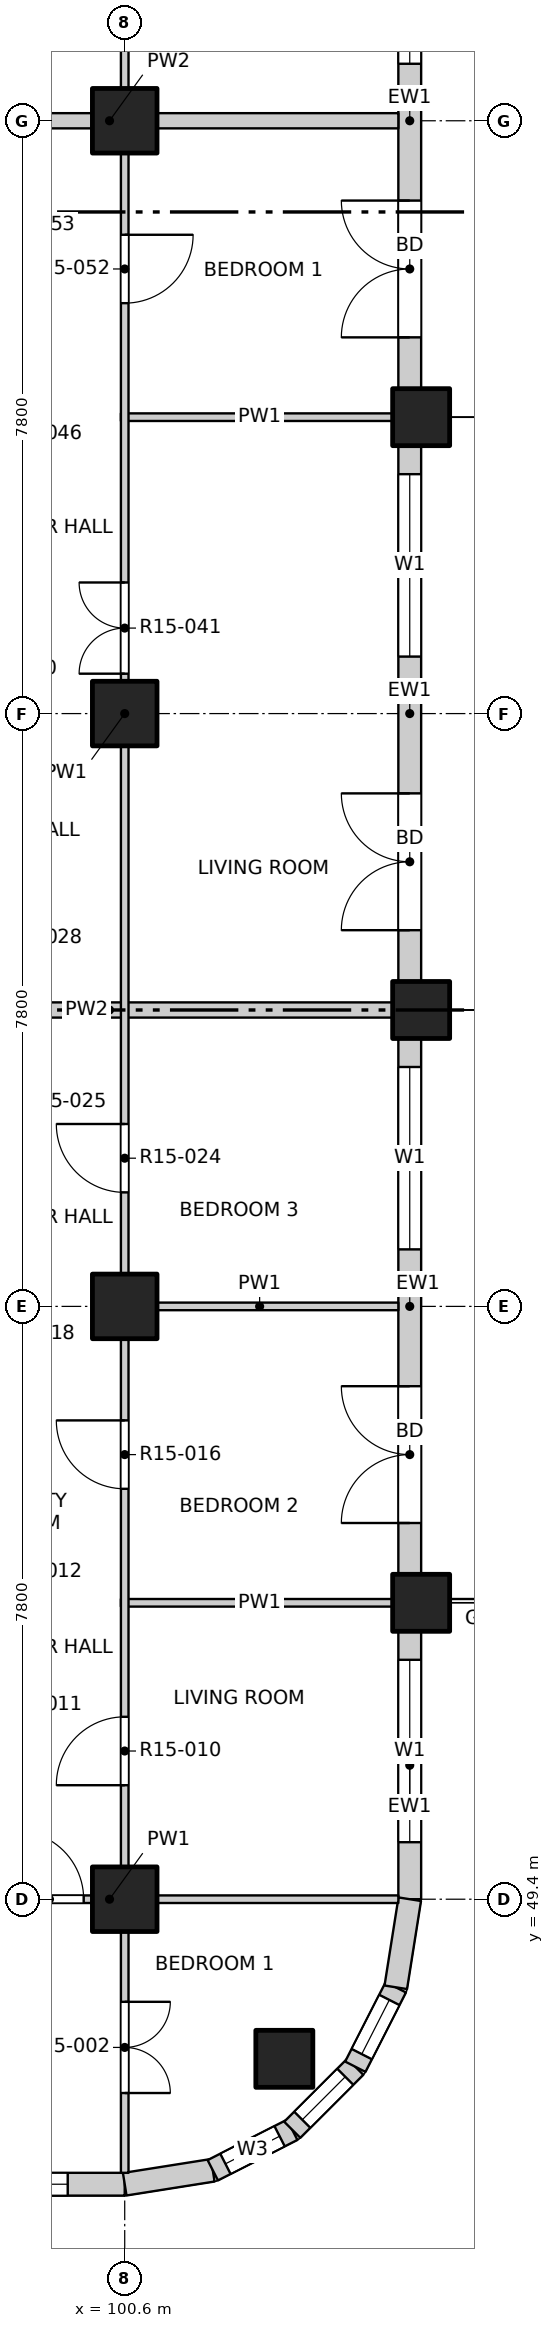
"""IFC4 building model, lengths in metres.
Left out: names, types, materials, properties, quantities, classifications, styles, units other than length and angle.
Written with IfcOpenShell. Run it as: python <this file> out.ifc"""

import sys

from ifc_helpers import new_model, si_unit, direction, frame, frame_2d, origin, origin_2d, place, context, subcontext, project, spatial, rectangle, extrude, element, fill, save


model = new_model("IFC4")
c1 = context("Model", 3, precision=1e-05, world=origin(), true_north=direction((0.0, 1.0)))
c2 = subcontext(c1, "Body", "Model", "MODEL_VIEW")
j1 = project(units=[si_unit("LENGTHUNIT", "METRE"), si_unit("PLANEANGLEUNIT", "RADIAN")], contexts=[c1])
p1 = place(None, origin())
s1 = spatial("IfcSite", under=j1, at=p1, CompositionType="ELEMENT")
p2 = place(p1, origin())
s2 = spatial("IfcBuilding", under=s1, at=p2, CompositionType="ELEMENT")
p3 = place(p2, frame((0.0, 0.0, 158.8)))
s3 = spatial("IfcBuildingStorey", under=s2, at=p3, CompositionType="ELEMENT", Elevation=158.8)
for number, where, z_axis, x_axis in (
    (1, (102.7, 47.3, -0.25), (0.0, 0.0, 1.0), (1.0, 0.0, 0.0)),
    (2, (104.5, 53.3, -0.25), (0.0, 0.0, 1.0), (1.0, 0.0, 0.0)),
    (3, (104.5, 61.1, -0.25), (0.0, 0.0, 1.0), (1.0, 0.0, 0.0)),
    (4, (104.5, 68.9, -0.25), (0.0, 0.0, 1.0), (1.0, 0.0, 0.0)),
):
    element("IfcColumn", number, at=place(p3, frame(where, z_axis=z_axis, x_axis=x_axis)), inside=s3, PredefinedType="COLUMN", context=c2, shape_type="SweptSolid", body=[
        extrude(rectangle(XDim=0.75, YDim=0.75, at=origin_2d()), origin(), (0.0, 0.0, 1.0), 3.4),
    ])
for number, where, z_axis, x_axis in (
    (5, (100.6, 49.4, -0.25), (0.0, 0.0, 1.0), (1.0, 0.0, 0.0)),
    (6, (100.6, 57.2, -0.25), (0.0, 0.0, 1.0), (1.0, 0.0, 0.0)),
    (7, (100.6, 65.0, -0.25), (0.0, 0.0, 1.0), (1.0, 0.0, 0.0)),
    (8, (100.6, 72.8, -0.25), (0.0, 0.0, 1.0), (1.0, 0.0, 0.0)),
):
    element("IfcColumn", number, at=place(p3, frame(where, z_axis=z_axis, x_axis=x_axis)), inside=s3, PredefinedType="COLUMN", context=c2, shape_type="SweptSolid", body=[
        extrude(rectangle(XDim=0.85, YDim=0.85, at=origin_2d()), origin(), (0.0, 0.0, 1.0), 3.4),
    ])
p4 = place(p3, frame((97.075, 45.65, 0.0), z_axis=(0.0, 0.0, 1.0), x_axis=(1.0, 0.0, 0.0)))
e9 = element("IfcWall", 9, at=p4, inside=s3, PredefinedType="SOLIDWALL", context=c2, shape_type="SweptSolid", body=[
    extrude(rectangle(XDim=3.525, YDim=0.3, at=frame_2d((1.763, 0.0))), origin(), (0.0, 0.0, 1.0), 2.7),
])
p5 = place(p4, frame((0.375, 0.0, 0.9)))
e10 = element("IfcOpeningElement", 10, at=p5, cuts=e9, PredefinedType="OPENING", context=c2, shape_type="SweptSolid", body=[
    extrude(rectangle(XDim=2.4, YDim=1.8, at=frame_2d((1.2, 0.9))), frame((0.0, 0.16, 0.0), z_axis=(0.0, -1.0, 0.0), x_axis=(1.0, 0.0, 0.0)), (0.0, 0.0, 1.0), 0.32),
])
p6 = place(p3, frame((104.35, 49.4, 0.0), z_axis=(0.0, 0.0, 1.0), x_axis=(0.0, 1.0, 0.0)))
e11 = element("IfcWall", 11, at=p6, inside=s3, PredefinedType="SOLIDWALL", context=c2, shape_type="SweptSolid", body=[
    extrude(rectangle(XDim=3.525, YDim=0.3, at=frame_2d((1.763, 0.0))), origin(), (0.0, 0.0, 1.0), 2.7),
])
p7 = place(p6, frame((0.75, 0.0, 0.9)))
e12 = element("IfcOpeningElement", 12, at=p7, cuts=e11, PredefinedType="OPENING", context=c2, shape_type="SweptSolid", body=[
    extrude(rectangle(XDim=2.4, YDim=1.8, at=frame_2d((1.2, 0.9))), frame((0.0, 0.16, 0.0), z_axis=(0.0, -1.0, 0.0), x_axis=(1.0, 0.0, 0.0)), (0.0, 0.0, 1.0), 0.32),
])
p8 = place(p3, frame((104.35, 53.675, 0.0), z_axis=(0.0, 0.0, 1.0), x_axis=(0.0, 1.0, 0.0)))
e13 = element("IfcWall", 13, at=p8, inside=s3, PredefinedType="SOLIDWALL", context=c2, shape_type="SweptSolid", body=[
    extrude(rectangle(XDim=7.05, YDim=0.3, at=frame_2d((3.525, 0.0))), origin(), (0.0, 0.0, 1.0), 2.7),
])
p9 = place(p8, frame((0.675, 0.0, 0.0)))
e14 = element("IfcOpeningElement", 14, at=p9, cuts=e13, PredefinedType="OPENING", context=c2, shape_type="SweptSolid", body=[
    extrude(rectangle(XDim=1.8, YDim=2.4, at=frame_2d((0.9, 1.2))), frame((0.0, 0.16, 0.0), z_axis=(0.0, -1.0, 0.0), x_axis=(1.0, 0.0, 0.0)), (0.0, 0.0, 1.0), 0.32),
])
p10 = place(p8, frame((4.275, 0.0, 0.9)))
e15 = element("IfcOpeningElement", 15, at=p10, cuts=e13, PredefinedType="OPENING", context=c2, shape_type="SweptSolid", body=[
    extrude(rectangle(XDim=2.4, YDim=1.8, at=frame_2d((1.2, 0.9))), frame((0.0, 0.16, 0.0), z_axis=(0.0, -1.0, 0.0), x_axis=(1.0, 0.0, 0.0)), (0.0, 0.0, 1.0), 0.32),
])
p11 = place(p3, frame((104.35, 61.475, 0.0), z_axis=(0.0, 0.0, 1.0), x_axis=(0.0, 1.0, 0.0)))
e16 = element("IfcWall", 16, at=p11, inside=s3, PredefinedType="SOLIDWALL", context=c2, shape_type="SweptSolid", body=[
    extrude(rectangle(XDim=7.05, YDim=0.3, at=frame_2d((3.525, 0.0))), origin(), (0.0, 0.0, 1.0), 2.7),
])
p12 = place(p11, frame((0.675, 0.0, 0.0)))
e17 = element("IfcOpeningElement", 17, at=p12, cuts=e16, PredefinedType="OPENING", context=c2, shape_type="SweptSolid", body=[
    extrude(rectangle(XDim=1.8, YDim=2.4, at=frame_2d((0.9, 1.2))), frame((0.0, 0.16, 0.0), z_axis=(0.0, -1.0, 0.0), x_axis=(1.0, 0.0, 0.0)), (0.0, 0.0, 1.0), 0.32),
])
p13 = place(p11, frame((4.275, 0.0, 0.9)))
e18 = element("IfcOpeningElement", 18, at=p13, cuts=e16, PredefinedType="OPENING", context=c2, shape_type="SweptSolid", body=[
    extrude(rectangle(XDim=2.4, YDim=1.8, at=frame_2d((1.2, 0.9))), frame((0.0, 0.16, 0.0), z_axis=(0.0, -1.0, 0.0), x_axis=(1.0, 0.0, 0.0)), (0.0, 0.0, 1.0), 0.32),
])
p14 = place(p3, frame((104.35, 69.275, 0.0), z_axis=(0.0, 0.0, 1.0), x_axis=(0.0, 1.0, 0.0)))
e19 = element("IfcWall", 19, at=p14, inside=s3, PredefinedType="SOLIDWALL", context=c2, shape_type="SweptSolid", body=[
    extrude(rectangle(XDim=7.05, YDim=0.3, at=frame_2d((3.525, 0.0))), origin(), (0.0, 0.0, 1.0), 2.7),
])
p15 = place(p14, frame((0.675, 0.0, 0.0)))
e20 = element("IfcOpeningElement", 20, at=p15, cuts=e19, PredefinedType="OPENING", context=c2, shape_type="SweptSolid", body=[
    extrude(rectangle(XDim=1.8, YDim=2.4, at=frame_2d((0.9, 1.2))), frame((0.0, 0.16, 0.0), z_axis=(0.0, -1.0, 0.0), x_axis=(1.0, 0.0, 0.0)), (0.0, 0.0, 1.0), 0.32),
])
p16 = place(p14, frame((4.275, 0.0, 0.9)))
e21 = element("IfcOpeningElement", 21, at=p16, cuts=e19, PredefinedType="OPENING", context=c2, shape_type="SweptSolid", body=[
    extrude(rectangle(XDim=2.4, YDim=1.8, at=frame_2d((1.2, 0.9))), frame((0.0, 0.16, 0.0), z_axis=(0.0, -1.0, 0.0), x_axis=(1.0, 0.0, 0.0)), (0.0, 0.0, 1.0), 0.32),
])
p17 = place(p3, frame((100.6, 45.65, 0.0), z_axis=(0.0, 0.0, 1.0), x_axis=(0.987678452879, 0.156496880861, 0.0)))
e22 = element("IfcWall", 22, at=p17, inside=s3, PredefinedType="SOLIDWALL", context=c2, shape_type="SweptSolid", body=[
    extrude(rectangle(XDim=1.173, YDim=0.3, at=frame_2d((0.586, 0.0))), origin(), (0.0, 0.0, 1.0), 2.7),
])
p18 = place(p3, frame((101.759, 45.833, 0.0), z_axis=(0.0, 0.0, 1.0), x_axis=(0.890988677504, 0.454025524128, 0.0)))
e23 = element("IfcWall", 23, at=p18, inside=s3, PredefinedType="SOLIDWALL", context=c2, shape_type="SweptSolid", body=[
    extrude(rectangle(XDim=1.173, YDim=0.3, at=frame_2d((0.587, 0.0))), origin(), (0.0, 0.0, 1.0), 2.7),
])
p19 = place(p18, frame((0.187, 0.0, 0.9)))
e24 = element("IfcOpeningElement", 24, at=p19, cuts=e23, PredefinedType="OPENING", context=c2, shape_type="SweptSolid", body=[
    extrude(rectangle(XDim=0.8, YDim=1.2, at=frame_2d((0.4, 0.6))), frame((0.0, 0.16, 0.0), z_axis=(0.0, -1.0, 0.0), x_axis=(1.0, 0.0, 0.0)), (0.0, 0.0, 1.0), 0.32),
])
p20 = place(p3, frame((102.804, 46.366, 0.0), z_axis=(0.0, 0.0, 1.0), x_axis=(0.707106781187, 0.707106781187, 0.0)))
e25 = element("IfcWall", 25, at=p20, inside=s3, PredefinedType="SOLIDWALL", context=c2, shape_type="SweptSolid", body=[
    extrude(rectangle(XDim=1.173, YDim=0.3, at=frame_2d((0.586, 0.0))), origin(), (0.0, 0.0, 1.0), 2.7),
])
p21 = place(p20, frame((0.187, 0.0, 0.9)))
e26 = element("IfcOpeningElement", 26, at=p21, cuts=e25, PredefinedType="OPENING", context=c2, shape_type="SweptSolid", body=[
    extrude(rectangle(XDim=0.8, YDim=1.2, at=frame_2d((0.4, 0.6))), frame((0.0, 0.16, 0.0), z_axis=(0.0, -1.0, 0.0), x_axis=(1.0, 0.0, 0.0)), (0.0, 0.0, 1.0), 0.32),
])
p22 = place(p3, frame((103.634, 47.196, 0.0), z_axis=(0.0, 0.0, 1.0), x_axis=(0.454025524128, 0.890988677504, 0.0)))
e27 = element("IfcWall", 27, at=p22, inside=s3, PredefinedType="SOLIDWALL", context=c2, shape_type="SweptSolid", body=[
    extrude(rectangle(XDim=1.173, YDim=0.3, at=frame_2d((0.587, 0.0))), origin(), (0.0, 0.0, 1.0), 2.7),
])
p23 = place(p22, frame((0.187, 0.0, 0.9)))
e28 = element("IfcOpeningElement", 28, at=p23, cuts=e27, PredefinedType="OPENING", context=c2, shape_type="SweptSolid", body=[
    extrude(rectangle(XDim=0.8, YDim=1.2, at=frame_2d((0.4, 0.6))), frame((0.0, 0.16, 0.0), z_axis=(0.0, -1.0, 0.0), x_axis=(1.0, 0.0, 0.0)), (0.0, 0.0, 1.0), 0.32),
])
p24 = place(p3, frame((104.167, 48.241, 0.0), z_axis=(0.0, 0.0, 1.0), x_axis=(0.156496880861, 0.987678452879, 0.0)))
e29 = element("IfcWall", 29, at=p24, inside=s3, PredefinedType="SOLIDWALL", context=c2, shape_type="SweptSolid", body=[
    extrude(rectangle(XDim=1.173, YDim=0.3, at=frame_2d((0.586, 0.0))), origin(), (0.0, 0.0, 1.0), 2.7),
])
p25 = place(p3, frame((96.6, 49.4, 0.0), z_axis=(0.0, 0.0, 1.0), x_axis=(1.0, 0.0, 0.0)))
e30 = element("IfcWall", 30, at=p25, inside=s3, PredefinedType="PARTITIONING", context=c2, shape_type="SweptSolid", body=[
    extrude(rectangle(XDim=7.6, YDim=0.1, at=frame_2d((3.8, 0.0))), origin(), (0.0, 0.0, 1.0), 3.15),
])
p26 = place(p25, frame((2.56, 0.0, 0.0)))
e31 = element("IfcOpeningElement", 31, at=p26, cuts=e30, PredefinedType="OPENING", context=c2, shape_type="SweptSolid", body=[
    extrude(rectangle(XDim=0.9, YDim=2.1, at=frame_2d((0.45, 1.05))), frame((0.0, 0.06, 0.0), z_axis=(0.0, -1.0, 0.0), x_axis=(1.0, 0.0, 0.0)), (0.0, 0.0, 1.0), 0.12),
])
for number, where, z_axis, x_axis in (
    (32, (100.55, 53.3, 0.0), (0.0, 0.0, 1.0), (1.0, 0.0, 0.0)),
    (33, (100.55, 57.2, 0.0), (0.0, 0.0, 1.0), (1.0, 0.0, 0.0)),
):
    element("IfcWall", number, at=place(p3, frame(where, z_axis=z_axis, x_axis=x_axis)), inside=s3, PredefinedType="PARTITIONING", context=c2, shape_type="SweptSolid", body=[
        extrude(rectangle(XDim=3.65, YDim=0.1, at=frame_2d((1.825, 0.0))), origin(), (0.0, 0.0, 1.0), 3.15),
    ])
p27 = place(p3, frame((96.6, 61.1, 0.0), z_axis=(0.0, 0.0, 1.0), x_axis=(1.0, 0.0, 0.0)))
e34 = element("IfcWall", 34, at=p27, inside=s3, PredefinedType="PARTITIONING", context=c2, shape_type="SweptSolid", body=[
    extrude(rectangle(XDim=7.6, YDim=0.2, at=frame_2d((3.8, 0.0))), origin(), (0.0, 0.0, 1.0), 2.55),
])
p28 = place(p3, frame((100.55, 68.9, 0.0), z_axis=(0.0, 0.0, 1.0), x_axis=(1.0, 0.0, 0.0)))
e35 = element("IfcWall", 35, at=p28, inside=s3, PredefinedType="PARTITIONING", context=c2, shape_type="SweptSolid", body=[
    extrude(rectangle(XDim=3.65, YDim=0.1, at=frame_2d((1.825, 0.0))), origin(), (0.0, 0.0, 1.0), 2.55),
])
p29 = place(p3, frame((96.6, 72.8, 0.0), z_axis=(0.0, 0.0, 1.0), x_axis=(1.0, 0.0, 0.0)))
e36 = element("IfcWall", 36, at=p29, inside=s3, PredefinedType="PARTITIONING", context=c2, shape_type="SweptSolid", body=[
    extrude(rectangle(XDim=7.6, YDim=0.2, at=frame_2d((3.8, 0.0))), origin(), (0.0, 0.0, 1.0), 3.15),
])
p30 = place(p3, frame((100.6, 45.8, 0.0), z_axis=(0.0, 0.0, 1.0), x_axis=(0.0, 1.0, 0.0)))
e37 = element("IfcWall", 37, at=p30, inside=s3, PredefinedType="PARTITIONING", context=c2, shape_type="SweptSolid", body=[
    extrude(rectangle(XDim=38.4, YDim=0.1, at=frame_2d((19.2, 0.0))), origin(), (0.0, 0.0, 1.0), 3.15),
])
p31 = place(p30, frame((1.05, 0.0, 0.0)))
e38 = element("IfcOpeningElement", 38, at=p31, cuts=e37, PredefinedType="OPENING", context=c2, shape_type="SweptSolid", body=[
    extrude(rectangle(XDim=1.2, YDim=2.1, at=frame_2d((0.6, 1.05))), frame((0.0, 0.06, 0.0), z_axis=(0.0, -1.0, 0.0), x_axis=(1.0, 0.0, 0.0)), (0.0, 0.0, 1.0), 0.12),
])
p32 = place(p30, frame((5.1, 0.0, 0.0)))
e39 = element("IfcOpeningElement", 39, at=p32, cuts=e37, PredefinedType="OPENING", context=c2, shape_type="SweptSolid", body=[
    extrude(rectangle(XDim=0.9, YDim=2.1, at=frame_2d((0.45, 1.05))), frame((0.0, 0.06, 0.0), z_axis=(0.0, -1.0, 0.0), x_axis=(1.0, 0.0, 0.0)), (0.0, 0.0, 1.0), 0.12),
])
p33 = place(p30, frame((9.0, 0.0, 0.0)))
e40 = element("IfcOpeningElement", 40, at=p33, cuts=e37, PredefinedType="OPENING", context=c2, shape_type="SweptSolid", body=[
    extrude(rectangle(XDim=0.9, YDim=2.1, at=frame_2d((0.45, 1.05))), frame((0.0, 0.06, 0.0), z_axis=(0.0, -1.0, 0.0), x_axis=(1.0, 0.0, 0.0)), (0.0, 0.0, 1.0), 0.12),
])
p34 = place(p30, frame((12.9, 0.0, 0.0)))
e41 = element("IfcOpeningElement", 41, at=p34, cuts=e37, PredefinedType="OPENING", context=c2, shape_type="SweptSolid", body=[
    extrude(rectangle(XDim=0.9, YDim=2.1, at=frame_2d((0.45, 1.05))), frame((0.0, 0.06, 0.0), z_axis=(0.0, -1.0, 0.0), x_axis=(1.0, 0.0, 0.0)), (0.0, 0.0, 1.0), 0.12),
])
p35 = place(p30, frame((19.725, 0.0, 0.0)))
e42 = element("IfcOpeningElement", 42, at=p35, cuts=e37, PredefinedType="OPENING", context=c2, shape_type="SweptSolid", body=[
    extrude(rectangle(XDim=1.2, YDim=2.1, at=frame_2d((0.6, 1.05))), frame((0.0, 0.06, 0.0), z_axis=(0.0, -1.0, 0.0), x_axis=(1.0, 0.0, 0.0)), (0.0, 0.0, 1.0), 0.12),
])
p36 = place(p30, frame((24.6, 0.0, 0.0)))
e43 = element("IfcOpeningElement", 43, at=p36, cuts=e37, PredefinedType="OPENING", context=c2, shape_type="SweptSolid", body=[
    extrude(rectangle(XDim=0.9, YDim=2.1, at=frame_2d((0.45, 1.05))), frame((0.0, 0.06, 0.0), z_axis=(0.0, -1.0, 0.0), x_axis=(1.0, 0.0, 0.0)), (0.0, 0.0, 1.0), 0.12),
])
p37 = place(p30, frame((30.3, 0.0, 0.0)))
e44 = element("IfcOpeningElement", 44, at=p37, cuts=e37, PredefinedType="OPENING", context=c2, shape_type="SweptSolid", body=[
    extrude(rectangle(XDim=1.2, YDim=2.1, at=frame_2d((0.6, 1.05))), frame((0.0, 0.06, 0.0), z_axis=(0.0, -1.0, 0.0), x_axis=(1.0, 0.0, 0.0)), (0.0, 0.0, 1.0), 0.12),
])
p38 = place(p30, frame((36.15, 0.0, 0.0)))
e45 = element("IfcOpeningElement", 45, at=p38, cuts=e37, PredefinedType="OPENING", context=c2, shape_type="SweptSolid", body=[
    extrude(rectangle(XDim=1.2, YDim=2.1, at=frame_2d((0.6, 1.05))), frame((0.0, 0.06, 0.0), z_axis=(0.0, -1.0, 0.0), x_axis=(1.0, 0.0, 0.0)), (0.0, 0.0, 1.0), 0.12),
])
p39 = place(p5, origin())
e46 = element("IfcWindow", 46, at=p39, inside=s3, PartitioningType="DOUBLE_PANEL_VERTICAL", PredefinedType="WINDOW", context=c2, shape_type="SweptSolid", body=[
    extrude(rectangle(XDim=2.4, YDim=1.8, at=frame_2d((1.2, 0.9))), frame((0.0, 0.03, 0.0), z_axis=(0.0, -1.0, 0.0), x_axis=(1.0, 0.0, 0.0)), (0.0, 0.0, 1.0), 0.06),
])
fill(e10, e46)
p40 = place(p7, origin())
e47 = element("IfcWindow", 47, at=p40, inside=s3, PartitioningType="DOUBLE_PANEL_VERTICAL", PredefinedType="WINDOW", context=c2, shape_type="SweptSolid", body=[
    extrude(rectangle(XDim=2.4, YDim=1.8, at=frame_2d((1.2, 0.9))), frame((0.0, 0.03, 0.0), z_axis=(0.0, -1.0, 0.0), x_axis=(1.0, 0.0, 0.0)), (0.0, 0.0, 1.0), 0.06),
])
fill(e12, e47)
p41 = place(p9, origin())
e48 = element("IfcDoor", 48, at=p41, inside=s3, OperationType="DOUBLE_DOOR_SINGLE_SWING", PredefinedType="DOOR", context=c2, shape_type="SweptSolid", body=[
    extrude(rectangle(XDim=1.8, YDim=2.4, at=frame_2d((0.9, 1.2))), frame((0.0, 0.025, 0.0), z_axis=(0.0, -1.0, 0.0), x_axis=(1.0, 0.0, 0.0)), (0.0, 0.0, 1.0), 0.05),
])
fill(e14, e48)
p42 = place(p10, origin())
e49 = element("IfcWindow", 49, at=p42, inside=s3, PartitioningType="DOUBLE_PANEL_VERTICAL", PredefinedType="WINDOW", context=c2, shape_type="SweptSolid", body=[
    extrude(rectangle(XDim=2.4, YDim=1.8, at=frame_2d((1.2, 0.9))), frame((0.0, 0.03, 0.0), z_axis=(0.0, -1.0, 0.0), x_axis=(1.0, 0.0, 0.0)), (0.0, 0.0, 1.0), 0.06),
])
fill(e15, e49)
p43 = place(p12, origin())
e50 = element("IfcDoor", 50, at=p43, inside=s3, OperationType="DOUBLE_DOOR_SINGLE_SWING", PredefinedType="DOOR", context=c2, shape_type="SweptSolid", body=[
    extrude(rectangle(XDim=1.8, YDim=2.4, at=frame_2d((0.9, 1.2))), frame((0.0, 0.025, 0.0), z_axis=(0.0, -1.0, 0.0), x_axis=(1.0, 0.0, 0.0)), (0.0, 0.0, 1.0), 0.05),
])
fill(e17, e50)
p44 = place(p13, origin())
e51 = element("IfcWindow", 51, at=p44, inside=s3, PartitioningType="DOUBLE_PANEL_VERTICAL", PredefinedType="WINDOW", context=c2, shape_type="SweptSolid", body=[
    extrude(rectangle(XDim=2.4, YDim=1.8, at=frame_2d((1.2, 0.9))), frame((0.0, 0.03, 0.0), z_axis=(0.0, -1.0, 0.0), x_axis=(1.0, 0.0, 0.0)), (0.0, 0.0, 1.0), 0.06),
])
fill(e18, e51)
p45 = place(p15, origin())
e52 = element("IfcDoor", 52, at=p45, inside=s3, OperationType="DOUBLE_DOOR_SINGLE_SWING", PredefinedType="DOOR", context=c2, shape_type="SweptSolid", body=[
    extrude(rectangle(XDim=1.8, YDim=2.4, at=frame_2d((0.9, 1.2))), frame((0.0, 0.025, 0.0), z_axis=(0.0, -1.0, 0.0), x_axis=(1.0, 0.0, 0.0)), (0.0, 0.0, 1.0), 0.05),
])
fill(e20, e52)
p46 = place(p16, origin())
e53 = element("IfcWindow", 53, at=p46, inside=s3, PartitioningType="DOUBLE_PANEL_VERTICAL", PredefinedType="WINDOW", context=c2, shape_type="SweptSolid", body=[
    extrude(rectangle(XDim=2.4, YDim=1.8, at=frame_2d((1.2, 0.9))), frame((0.0, 0.03, 0.0), z_axis=(0.0, -1.0, 0.0), x_axis=(1.0, 0.0, 0.0)), (0.0, 0.0, 1.0), 0.06),
])
fill(e21, e53)
p47 = place(p19, origin())
e54 = element("IfcWindow", 54, at=p47, inside=s3, PartitioningType="SINGLE_PANEL", PredefinedType="WINDOW", context=c2, shape_type="SweptSolid", body=[
    extrude(rectangle(XDim=0.8, YDim=1.2, at=frame_2d((0.4, 0.6))), frame((0.0, 0.03, 0.0), z_axis=(0.0, -1.0, 0.0), x_axis=(1.0, 0.0, 0.0)), (0.0, 0.0, 1.0), 0.06),
])
fill(e24, e54)
p48 = place(p21, origin())
e55 = element("IfcWindow", 55, at=p48, inside=s3, PartitioningType="SINGLE_PANEL", PredefinedType="WINDOW", context=c2, shape_type="SweptSolid", body=[
    extrude(rectangle(XDim=0.8, YDim=1.2, at=frame_2d((0.4, 0.6))), frame((0.0, 0.03, 0.0), z_axis=(0.0, -1.0, 0.0), x_axis=(1.0, 0.0, 0.0)), (0.0, 0.0, 1.0), 0.06),
])
fill(e26, e55)
p49 = place(p23, origin())
e56 = element("IfcWindow", 56, at=p49, inside=s3, PartitioningType="SINGLE_PANEL", PredefinedType="WINDOW", context=c2, shape_type="SweptSolid", body=[
    extrude(rectangle(XDim=0.8, YDim=1.2, at=frame_2d((0.4, 0.6))), frame((0.0, 0.03, 0.0), z_axis=(0.0, -1.0, 0.0), x_axis=(1.0, 0.0, 0.0)), (0.0, 0.0, 1.0), 0.06),
])
fill(e28, e56)
p50 = place(p31, origin())
e57 = element("IfcDoor", 57, at=p50, inside=s3, OperationType="DOUBLE_DOOR_SINGLE_SWING", PredefinedType="DOOR", context=c2, shape_type="SweptSolid", body=[
    extrude(rectangle(XDim=1.2, YDim=2.1, at=frame_2d((0.6, 1.05))), frame((0.0, 0.025, 0.0), z_axis=(0.0, -1.0, 0.0), x_axis=(1.0, 0.0, 0.0)), (0.0, 0.0, 1.0), 0.05),
])
fill(e38, e57)
p51 = place(p26, origin())
e58 = element("IfcDoor", 58, at=p51, inside=s3, OperationType="SINGLE_SWING_LEFT", PredefinedType="DOOR", context=c2, shape_type="SweptSolid", body=[
    extrude(rectangle(XDim=0.9, YDim=2.1, at=frame_2d((0.45, 1.05))), frame((0.0, 0.025, 0.0), z_axis=(0.0, -1.0, 0.0), x_axis=(1.0, 0.0, 0.0)), (0.0, 0.0, 1.0), 0.05),
])
fill(e31, e58)
p52 = place(p32, origin())
e59 = element("IfcDoor", 59, at=p52, inside=s3, OperationType="SINGLE_SWING_LEFT", PredefinedType="DOOR", context=c2, shape_type="SweptSolid", body=[
    extrude(rectangle(XDim=0.9, YDim=2.1, at=frame_2d((0.45, 1.05))), frame((0.0, 0.025, 0.0), z_axis=(0.0, -1.0, 0.0), x_axis=(1.0, 0.0, 0.0)), (0.0, 0.0, 1.0), 0.05),
])
fill(e39, e59)
p53 = place(p33, origin())
e60 = element("IfcDoor", 60, at=p53, inside=s3, OperationType="SINGLE_SWING_RIGHT", PredefinedType="DOOR", context=c2, shape_type="SweptSolid", body=[
    extrude(rectangle(XDim=0.9, YDim=2.1, at=frame_2d((0.45, 1.05))), frame((0.0, 0.025, 0.0), z_axis=(0.0, -1.0, 0.0), x_axis=(1.0, 0.0, 0.0)), (0.0, 0.0, 1.0), 0.05),
])
fill(e40, e60)
p54 = place(p34, origin())
e61 = element("IfcDoor", 61, at=p54, inside=s3, OperationType="SINGLE_SWING_RIGHT", PredefinedType="DOOR", context=c2, shape_type="SweptSolid", body=[
    extrude(rectangle(XDim=0.9, YDim=2.1, at=frame_2d((0.45, 1.05))), frame((0.0, 0.025, 0.0), z_axis=(0.0, -1.0, 0.0), x_axis=(1.0, 0.0, 0.0)), (0.0, 0.0, 1.0), 0.05),
])
fill(e41, e61)
p55 = place(p35, origin())
e62 = element("IfcDoor", 62, at=p55, inside=s3, OperationType="DOUBLE_DOOR_SINGLE_SWING", PredefinedType="DOOR", context=c2, shape_type="SweptSolid", body=[
    extrude(rectangle(XDim=1.2, YDim=2.1, at=frame_2d((0.6, 1.05))), frame((0.0, 0.025, 0.0), z_axis=(0.0, -1.0, 0.0), x_axis=(1.0, 0.0, 0.0)), (0.0, 0.0, 1.0), 0.05),
])
fill(e42, e62)
p56 = place(p36, origin())
e63 = element("IfcDoor", 63, at=p56, inside=s3, OperationType="SINGLE_SWING_LEFT", PredefinedType="DOOR", context=c2, shape_type="SweptSolid", body=[
    extrude(rectangle(XDim=0.9, YDim=2.1, at=frame_2d((0.45, 1.05))), frame((0.0, 0.025, 0.0), z_axis=(0.0, -1.0, 0.0), x_axis=(1.0, 0.0, 0.0)), (0.0, 0.0, 1.0), 0.05),
])
fill(e43, e63)
save(model, sys.argv[1])
